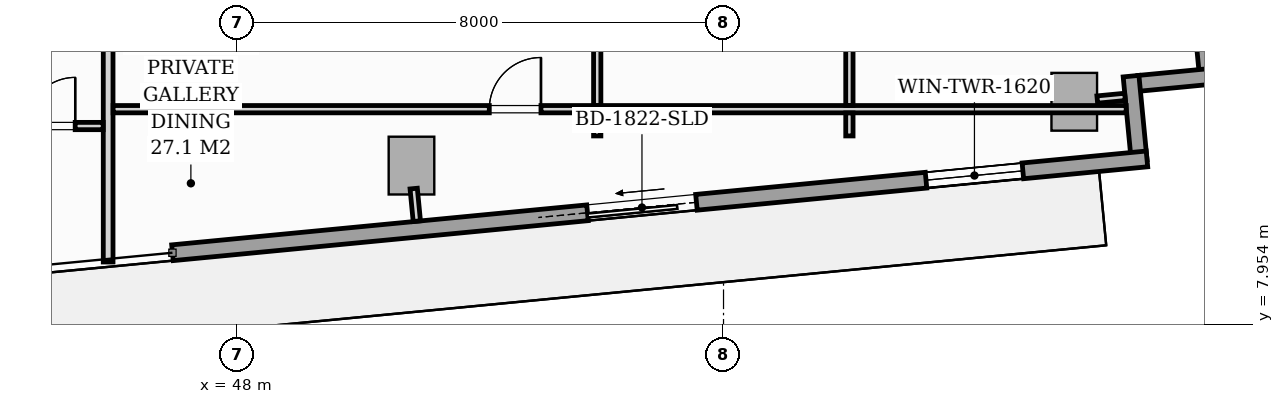
"""IFC4 building model, lengths in metres.
Left out: names, types, materials, properties, quantities, classifications, styles, units other than length and angle.
Written with IfcOpenShell. Run it as: python <this file> out.ifc"""

import sys

from ifc_helpers import new_model, si_unit, direction, frame, frame_2d, origin, origin_2d, place, context, subcontext, project, spatial, rectangle, extrude, source, transform, mapped, element, fill, save


model = new_model("IFC4")
c1 = context("Model", 3, precision=1e-05, world=origin(), true_north=direction((0.0, 1.0)))
c2 = subcontext(c1, "Body", "Model", "MODEL_VIEW")
j1 = project(units=[si_unit("LENGTHUNIT", "METRE"), si_unit("PLANEANGLEUNIT", "RADIAN")], contexts=[c1])
p1 = place(None, origin())
s1 = spatial("IfcSite", under=j1, at=p1, CompositionType="ELEMENT")
p2 = place(p1, origin())
s2 = spatial("IfcBuilding", under=s1, at=p2, CompositionType="ELEMENT")
p3 = place(p2, frame((0.0, 0.0, 201.8)))
s3 = spatial("IfcBuildingStorey", under=s2, at=p3, CompositionType="ELEMENT", Elevation=201.8)
m1 = source(origin(), c2, "Body", "SweptSolid", [
    extrude(rectangle(XDim=0.75, YDim=0.95, at=origin_2d()), origin(), (0.0, 0.0, 1.0), 3.196),
])
for number, where, z_axis, x_axis in (
    (1, (50.868, 10.566, 0.002), (0.0, 0.0, 1.0), (0.995, 0.096, 0.0)),
    (2, (61.768, 11.616, 0.002), (0.0, 0.0, 1.0), (0.995, 0.096, 0.0)),
):
    element("IfcColumn", number, at=place(p3, frame(where, z_axis=z_axis, x_axis=x_axis)), inside=s3, PredefinedType="COLUMN", context=c2, shape_type="MappedRepresentation", body=[
        mapped(m1, transform((0.0, 0.0, 0.0), scale=1.0)),
    ])
p4 = place(p3, frame((63.826, 13.401, 0.0), z_axis=(0.0, 0.0, 1.0), x_axis=(0.095915846097, -0.995389446633, 0.0)))
e3 = element("IfcWall", 3, at=p4, inside=s3, PredefinedType="STANDARD", context=c2, shape_type="SweptSolid", body=[
    extrude(rectangle(XDim=1.395, YDim=0.26, at=frame_2d((0.697, 0.0))), origin(), (0.0, 0.0, 1.0), 2.94),
])
for number, where, z_axis, x_axis in (
    (4, (64.217, 12.053, 0.0), (0.0, 0.0, 1.0), (-0.995, -0.096, 0.0)),
    (5, (62.702, 12.037, 0.0), (0.0, 0.0, 1.0), (0.096, -0.995, 0.0)),
):
    element("IfcWall", number, at=place(p3, frame(where, z_axis=z_axis, x_axis=x_axis)), inside=s3, PredefinedType="STANDARD", context=c2, shape_type="SweptSolid", body=[
        extrude(rectangle(XDim=1.395, YDim=0.26, at=frame_2d((0.698, 0.0))), origin(), (0.0, 0.0, 1.0), 2.94),
    ])
p5 = place(p3, frame((62.963, 10.676, 0.0), z_axis=(0.0, 0.0, 1.0), x_axis=(-0.995395627913, -0.095851676732, 0.0)))
e6 = element("IfcWall", 6, at=p5, inside=s3, PredefinedType="STANDARD", context=c2, shape_type="SweptSolid", body=[
    extrude(rectangle(XDim=16.1, YDim=0.26, at=frame_2d((8.05, 0.0))), origin(), (0.0, 0.0, 1.0), 2.94),
])
p6 = place(p5, frame((7.443, 0.0, 0.0)))
e7 = element("IfcOpeningElement", 7, at=p6, cuts=e6, PredefinedType="OPENING", context=c2, shape_type="SweptSolid", body=[
    extrude(rectangle(XDim=1.8, YDim=2.06, at=frame_2d((0.9, 1.03))), frame((0.0, 0.14, 0.0), z_axis=(0.0, -1.0, 0.0), x_axis=(1.0, 0.0, 0.0)), (0.0, 0.0, 1.0), 0.28),
])
p7 = place(p5, frame((2.05, 0.0, 0.65)))
e8 = element("IfcOpeningElement", 8, at=p7, cuts=e6, PredefinedType="OPENING", context=c2, shape_type="SweptSolid", body=[
    extrude(rectangle(XDim=1.6, YDim=1.5, at=frame_2d((0.8, 0.75))), frame((0.0, 0.14, 0.0), z_axis=(0.0, -1.0, 0.0), x_axis=(1.0, 0.0, 0.0)), (0.0, 0.0, 1.0), 0.28),
])
p8 = place(p3, frame((45.88, 8.981, 0.0), z_axis=(0.0, 0.0, 1.0), x_axis=(0.0, 1.0, 0.0)))
e9 = element("IfcWall", 9, at=p8, inside=s3, PredefinedType="PARTITIONING", context=c2, shape_type="SweptSolid", body=[
    extrude(rectangle(XDim=4.297, YDim=0.16, at=frame_2d((2.148, 0.0))), origin(), (0.0, 0.0, 1.0), 2.94),
])
p9 = place(p3, frame((42.122, 11.217, 0.0), z_axis=(0.0, 0.0, 1.0), x_axis=(1.0, 0.0, 0.0)))
e10 = element("IfcWall", 10, at=p9, inside=s3, PredefinedType="PARTITIONING", context=c2, shape_type="SweptSolid", body=[
    extrude(rectangle(XDim=3.676, YDim=0.12, at=frame_2d((1.838, 0.0))), origin(), (0.0, 0.0, 1.0), 2.94),
])
p10 = place(p9, frame((0.552, 0.0, 0.0)))
e11 = element("IfcOpeningElement", 11, at=p10, cuts=e10, PredefinedType="OPENING", context=c2, shape_type="SweptSolid", body=[
    extrude(rectangle(XDim=0.85, YDim=2.05, at=frame_2d((0.425, 1.025))), frame((0.0, 0.07, 0.0), z_axis=(0.0, -1.0, 0.0), x_axis=(1.0, 0.0, 0.0)), (0.0, 0.0, 1.0), 0.14),
])
p11 = place(p9, frame((2.416, 0.0, 0.0)))
e12 = element("IfcOpeningElement", 12, at=p11, cuts=e10, PredefinedType="OPENING", context=c2, shape_type="SweptSolid", body=[
    extrude(rectangle(XDim=0.8, YDim=2.02, at=frame_2d((0.4, 1.01))), frame((0.0, 0.07, 0.0), z_axis=(0.0, -1.0, 0.0), x_axis=(1.0, 0.0, 0.0)), (0.0, 0.0, 1.0), 0.14),
])
p12 = place(p3, frame((45.962, 11.494, 0.0), z_axis=(0.0, 0.0, 1.0), x_axis=(1.0, 0.0, 0.0)))
e13 = element("IfcWall", 13, at=p12, inside=s3, PredefinedType="PARTITIONING", context=c2, shape_type="SweptSolid", body=[
    extrude(rectangle(XDim=16.66, YDim=0.12, at=frame_2d((8.33, 0.0))), origin(), (0.0, 0.0, 1.0), 2.383),
])
p13 = place(p12, frame((6.186, 0.0, 0.0)))
e14 = element("IfcOpeningElement", 14, at=p13, cuts=e13, PredefinedType="OPENING", context=c2, shape_type="SweptSolid", body=[
    extrude(rectangle(XDim=0.85, YDim=2.05, at=frame_2d((0.425, 1.025))), frame((0.0, 0.07, 0.0), z_axis=(0.0, -1.0, 0.0), x_axis=(1.0, 0.0, 0.0)), (0.0, 0.0, 1.0), 0.14),
])
p14 = place(p3, frame((58.07, 11.054, 0.0), z_axis=(0.0, 0.0, 1.0), x_axis=(0.0, 1.0, 0.0)))
e15 = element("IfcWall", 15, at=p14, inside=s3, PredefinedType="PARTITIONING", context=c2, shape_type="SweptSolid", body=[
    extrude(rectangle(XDim=0.378, YDim=0.12, at=frame_2d((0.189, 0.0))), origin(), (0.0, 0.0, 1.0), 2.94),
])
p15 = place(p3, frame((58.07, 11.556, 0.0), z_axis=(0.0, 0.0, 1.0), x_axis=(0.0, 1.0, 0.0)))
e16 = element("IfcWall", 16, at=p15, inside=s3, PredefinedType="PARTITIONING", context=c2, shape_type="SweptSolid", body=[
    extrude(rectangle(XDim=9.509, YDim=0.12, at=frame_2d((4.754, 0.0))), origin(), (0.0, 0.0, 1.0), 2.94),
])
p16 = place(p15, frame((4.329, 0.0, 0.0)))
e17 = element("IfcOpeningElement", 17, at=p16, cuts=e16, PredefinedType="OPENING", context=c2, shape_type="SweptSolid", body=[
    extrude(rectangle(XDim=0.85, YDim=2.05, at=frame_2d((0.425, 1.025))), frame((0.0, 0.07, 0.0), z_axis=(0.0, -1.0, 0.0), x_axis=(1.0, 0.0, 0.0)), (0.0, 0.0, 1.0), 0.14),
])
p17 = place(p3, frame((53.923, 11.054, 0.0), z_axis=(0.0, 0.0, 1.0), x_axis=(0.0, 1.0, 0.0)))
e18 = element("IfcWall", 18, at=p17, inside=s3, PredefinedType="PARTITIONING", context=c2, shape_type="SweptSolid", body=[
    extrude(rectangle(XDim=0.378, YDim=0.12, at=frame_2d((0.189, 0.0))), origin(), (0.0, 0.0, 1.0), 2.94),
])
p18 = place(p3, frame((53.923, 11.556, 0.0), z_axis=(0.0, 0.0, 1.0), x_axis=(0.0, 1.0, 0.0)))
e19 = element("IfcWall", 19, at=p18, inside=s3, PredefinedType="PARTITIONING", context=c2, shape_type="SweptSolid", body=[
    extrude(rectangle(XDim=9.509, YDim=0.12, at=frame_2d((4.754, 0.0))), origin(), (0.0, 0.0, 1.0), 2.94),
])
p19 = place(p18, frame((4.329, 0.0, 0.0)))
e20 = element("IfcOpeningElement", 20, at=p19, cuts=e19, PredefinedType="OPENING", context=c2, shape_type="SweptSolid", body=[
    extrude(rectangle(XDim=0.85, YDim=2.05, at=frame_2d((0.425, 1.025))), frame((0.0, 0.07, 0.0), z_axis=(0.0, -1.0, 0.0), x_axis=(1.0, 0.0, 0.0)), (0.0, 0.0, 1.0), 0.14),
])
p20 = place(p3, frame((50.905, 10.188, 0.0), z_axis=(0.0, 0.0, 1.0), x_axis=(0.095772948675, -0.995403205893, 0.0)))
e21 = element("IfcWall", 21, at=p20, inside=s3, PredefinedType="PARTITIONING", context=c2, shape_type="SweptSolid", body=[
    extrude(rectangle(XDim=0.538, YDim=0.12, at=frame_2d((0.269, 0.0))), origin(), (0.0, 0.0, 1.0), 2.94),
])
p21 = place(p3, frame((62.146, 11.652, 0.0), z_axis=(0.0, 0.0, 1.0), x_axis=(0.995384576284, 0.09596637586, 0.0)))
e22 = element("IfcWall", 22, at=p21, inside=s3, PredefinedType="PARTITIONING", context=c2, shape_type="SweptSolid", body=[
    extrude(rectangle(XDim=0.458, YDim=0.12, at=frame_2d((0.229, 0.0))), origin(), (0.0, 0.0, 1.0), 2.94),
])
m2 = source(origin(), c2, "Body", "SweptSolid", [
    extrude(rectangle(XDim=1.8, YDim=2.06, at=frame_2d((0.9, 1.03))), frame((0.0, 0.025, 0.0), z_axis=(0.0, -1.0, 0.0), x_axis=(1.0, 0.0, 0.0)), (0.0, 0.0, 1.0), 0.05),
])
p22 = place(p6, origin())
e23 = element("IfcDoor", 23, at=p22, inside=s3, OperationType="SLIDING_TO_RIGHT", PredefinedType="DOOR", context=c2, shape_type="MappedRepresentation", body=[
    mapped(m2, transform((0.0, 0.0, 0.0), scale=1.0)),
])
fill(e7, e23)
m3 = source(origin(), c2, "Body", "SweptSolid", [
    extrude(rectangle(XDim=1.6, YDim=1.5, at=frame_2d((0.8, 0.75))), frame((0.0, 0.03, 0.0), z_axis=(0.0, -1.0, 0.0), x_axis=(1.0, 0.0, 0.0)), (0.0, 0.0, 1.0), 0.06),
])
p23 = place(p7, origin())
e24 = element("IfcWindow", 24, at=p23, inside=s3, PartitioningType="SINGLE_PANEL", PredefinedType="WINDOW", context=c2, shape_type="MappedRepresentation", body=[
    mapped(m3, transform((0.0, 0.0, 0.0), scale=1.0)),
])
fill(e8, e24)
m4 = source(origin(), c2, "Body", "SweptSolid", [
    extrude(rectangle(XDim=0.8, YDim=2.02, at=frame_2d((0.4, 1.01))), frame((0.0, 0.025, 0.0), z_axis=(0.0, -1.0, 0.0), x_axis=(1.0, 0.0, 0.0)), (0.0, 0.0, 1.0), 0.05),
])
p24 = place(p11, origin())
e25 = element("IfcDoor", 25, at=p24, inside=s3, OperationType="SINGLE_SWING_RIGHT", PredefinedType="DOOR", context=c2, shape_type="MappedRepresentation", body=[
    mapped(m4, transform((0.0, 0.0, 0.0), scale=1.0)),
])
fill(e12, e25)
m5 = source(origin(), c2, "Body", "SweptSolid", [
    extrude(rectangle(XDim=0.85, YDim=2.05, at=frame_2d((0.425, 1.025))), frame((0.0, 0.025, 0.0), z_axis=(0.0, -1.0, 0.0), x_axis=(1.0, 0.0, 0.0)), (0.0, 0.0, 1.0), 0.05),
])
p25 = place(p13, origin())
e26 = element("IfcDoor", 26, at=p25, inside=s3, OperationType="SINGLE_SWING_RIGHT", PredefinedType="DOOR", context=c2, shape_type="MappedRepresentation", body=[
    mapped(m5, transform((0.0, 0.0, 0.0), scale=1.0)),
])
fill(e14, e26)
save(model, sys.argv[1])
